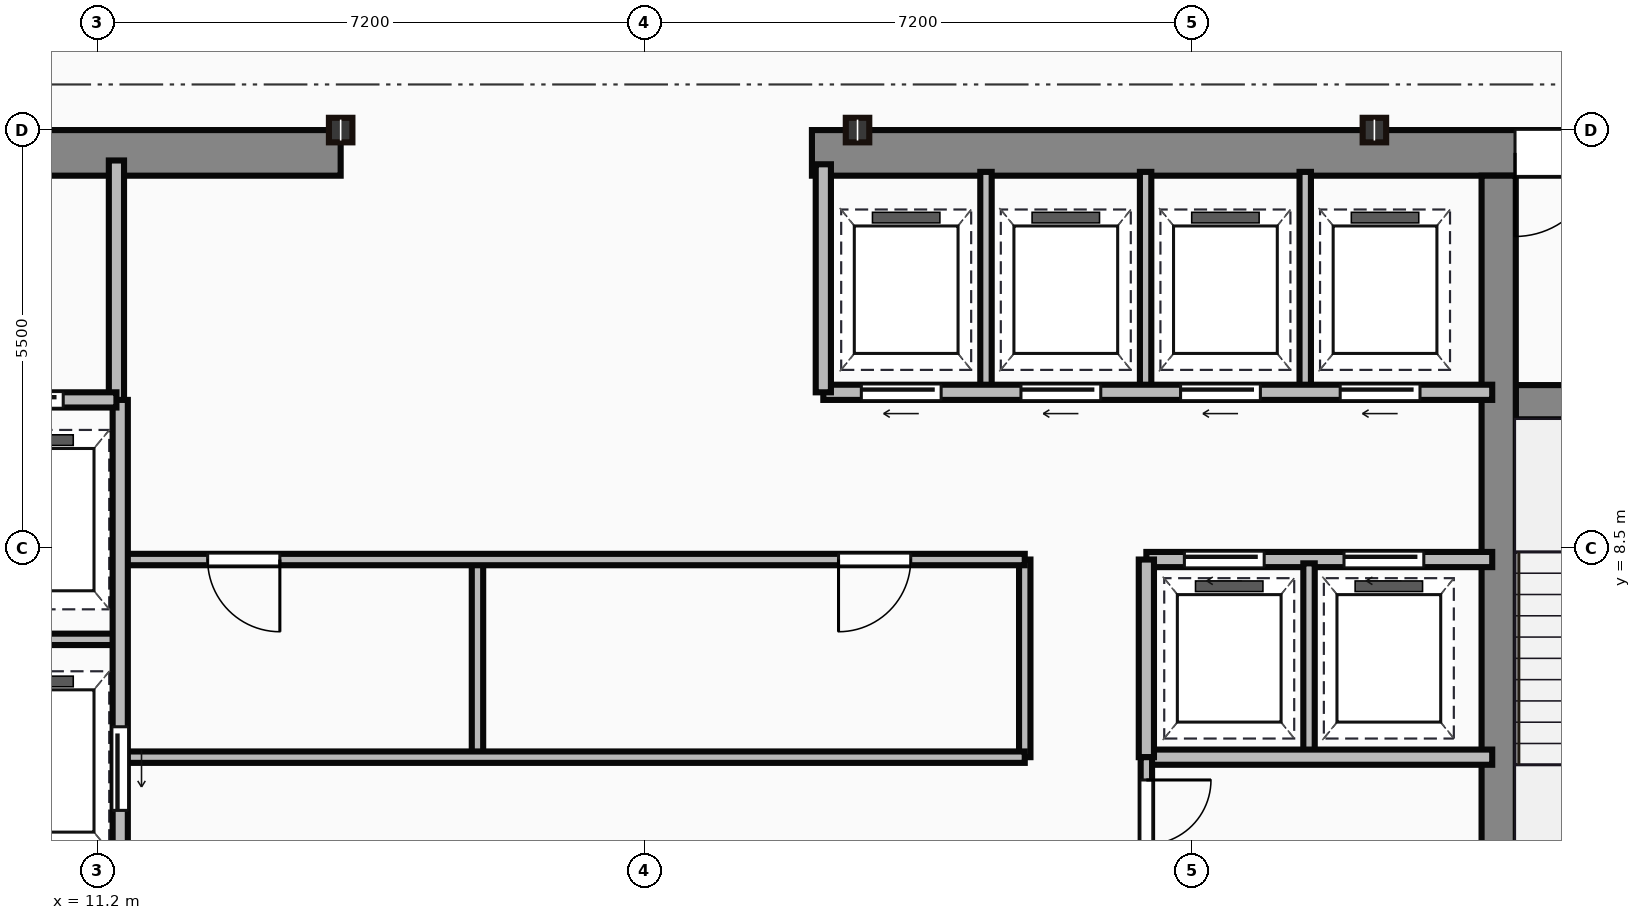
"""IFC4 building model, lengths in metres.
Left out: names, types, materials, properties, quantities, classifications, styles, units other than length and angle.
Written with IfcOpenShell. Run it as: python <this file> out.ifc"""

import sys

from ifc_helpers import new_model, si_unit, direction, frame, frame_2d, origin, origin_2d, place, context, subcontext, project, spatial, rectangle, i_section, extrude, source, transform, mapped, element, fill, save


model = new_model("IFC4")
c1 = context("Model", 3, precision=1e-05, world=origin(), true_north=direction((0.0, 1.0)))
c2 = subcontext(c1, "Body", "Model", "MODEL_VIEW")
j1 = project(units=[si_unit("LENGTHUNIT", "METRE"), si_unit("PLANEANGLEUNIT", "RADIAN")], contexts=[c1])
p1 = place(None, origin())
s1 = spatial("IfcSite", under=j1, at=p1, CompositionType="ELEMENT")
p2 = place(p1, origin())
s2 = spatial("IfcBuilding", under=s1, at=p2, CompositionType="ELEMENT")
p3 = place(p2, frame((0.0, 0.0, 228.75)))
s3 = spatial("IfcBuildingStorey", under=s2, at=p3, CompositionType="ELEMENT", Elevation=228.75)
m1 = source(origin(), c2, "Body", "SweptSolid", [
    extrude(rectangle(XDim=9.1, YDim=0.6, at=frame_2d((4.55, 0.0))), origin(), (0.0, 0.0, 1.0), 3.65),
])
p4 = place(p3, frame((5.3, 13.7, 0.0), z_axis=(0.0, 0.0, 1.0), x_axis=(1.0, 0.0, 0.0)))
e1 = element("IfcWall", 1, at=p4, inside=s3, PredefinedType="SHEAR", context=c2, shape_type="MappedRepresentation", body=[
    mapped(m1, transform((0.0, 0.0, 0.0))),
])
p5 = place(p4, frame((4.1, 0.0, 0.0)))
e2 = element("IfcOpeningElement", 2, at=p5, cuts=e1, PredefinedType="OPENING", context=c2, shape_type="SweptSolid", body=[
    extrude(rectangle(XDim=1.1, YDim=2.15, at=frame_2d((0.55, 1.075))), frame((0.0, 0.31, 0.0), z_axis=(0.0, -1.0, 0.0), x_axis=(1.0, 0.0, 0.0)), (0.0, 0.0, 1.0), 0.62),
])
m2 = source(origin(), c2, "Body", "SweptSolid", [
    extrude(rectangle(XDim=12.6, YDim=0.6, at=frame_2d((6.3, 0.0))), origin(), (0.0, 0.0, 1.0), 3.65),
])
p6 = place(p3, frame((20.6, 13.7, 0.0), z_axis=(0.0, 0.0, 1.0), x_axis=(1.0, 0.0, 0.0)))
e3 = element("IfcWall", 3, at=p6, inside=s3, PredefinedType="SHEAR", context=c2, shape_type="MappedRepresentation", body=[
    mapped(m2, transform((0.0, 0.0, 0.0))),
])
p7 = place(p6, frame((9.25, 0.0, 0.0)))
e4 = element("IfcOpeningElement", 4, at=p7, cuts=e3, PredefinedType="OPENING", context=c2, shape_type="SweptSolid", body=[
    extrude(rectangle(XDim=1.1, YDim=2.15, at=frame_2d((0.55, 1.075))), frame((0.0, 0.31, 0.0), z_axis=(0.0, -1.0, 0.0), x_axis=(1.0, 0.0, 0.0)), (0.0, 0.0, 1.0), 0.62),
])
m3 = source(origin(), c2, "Body", "SweptSolid", [
    extrude(rectangle(XDim=12.5, YDim=0.45, at=frame_2d((6.25, 0.0))), origin(), (0.0, 0.0, 1.0), 3.65),
])
p8 = place(p3, frame((29.635, 0.9, 0.0), z_axis=(0.0, 0.0, 1.0), x_axis=(0.0, 1.0, 0.0)))
e5 = element("IfcWall", 5, at=p8, inside=s3, PredefinedType="SHEAR", context=c2, shape_type="MappedRepresentation", body=[
    mapped(m3, transform((0.0, 0.0, 0.0))),
])
m4 = source(origin(), c2, "Body", "SweptSolid", [
    extrude(rectangle(XDim=3.39, YDim=0.45, at=frame_2d((1.695, 0.0))), origin(), (0.0, 0.0, 1.0), 3.65),
])
p9 = place(p3, frame((29.86, 10.42, 0.0), z_axis=(0.0, 0.0, 1.0), x_axis=(1.0, 0.0, 0.0)))
e6 = element("IfcWall", 6, at=p9, inside=s3, PredefinedType="SHEAR", context=c2, shape_type="MappedRepresentation", body=[
    mapped(m4, transform((0.0, 0.0, 0.0))),
])
p10 = place(p9, frame((1.1, 0.0, 0.0)))
e7 = element("IfcOpeningElement", 7, at=p10, cuts=e6, PredefinedType="OPENING", context=c2, shape_type="SweptSolid", body=[
    extrude(rectangle(XDim=1.1, YDim=2.15, at=frame_2d((0.55, 1.075))), frame((0.0, 0.235, 0.0), z_axis=(0.0, -1.0, 0.0), x_axis=(1.0, 0.0, 0.0)), (0.0, 0.0, 1.0), 0.47),
])
m5 = source(origin(), c2, "Body", "SweptSolid", [
    extrude(i_section(OverallWidth=0.309, OverallDepth=0.323, WebThickness=0.014, FlangeThickness=0.023, at=origin_2d()), origin(), (0.0, 0.0, 1.0), 3.65),
])
for number, where, z_axis, x_axis in (
    (8, (14.4, 14.0, 0.0), (0.0, 0.0, 1.0), (1.0, 0.0, 0.0)),
    (9, (21.2, 14.0, 0.0), (0.0, 0.0, 1.0), (1.0, 0.0, 0.0)),
    (10, (28.0, 14.0, 0.0), (0.0, 0.0, 1.0), (1.0, 0.0, 0.0)),
):
    element("IfcColumn", number, at=place(p3, frame(where, z_axis=z_axis, x_axis=x_axis)), inside=s3, PredefinedType="COLUMN", context=c2, shape_type="MappedRepresentation", body=[
        mapped(m5, transform((0.0, 0.0, 0.0))),
    ])
m6 = source(origin(), c2, "Body", "SweptSolid", [
    extrude(rectangle(XDim=3.18, YDim=0.2, at=frame_2d((1.59, 0.0))), origin(), (0.0, 0.0, 1.0), 3.4),
])
p11 = place(p3, frame((11.45, 10.42, 0.0), z_axis=(0.0, 0.0, 1.0), x_axis=(0.0, 1.0, 0.0)))
e11 = element("IfcWall", 11, at=p11, inside=s3, PredefinedType="PARTITIONING", context=c2, shape_type="MappedRepresentation", body=[
    mapped(m6, transform((0.0, 0.0, 0.0))),
])
m7 = source(origin(), c2, "Body", "SweptSolid", [
    extrude(rectangle(XDim=2.35, YDim=0.2, at=frame_2d((1.175, 0.0))), origin(), (0.0, 0.0, 1.0), 3.4),
])
p12 = place(p3, frame((9.1, 10.45, 0.0), z_axis=(0.0, 0.0, 1.0), x_axis=(1.0, 0.0, 0.0)))
e12 = element("IfcWall", 12, at=p12, inside=s3, PredefinedType="PARTITIONING", context=c2, shape_type="MappedRepresentation", body=[
    mapped(m7, transform((0.0, 0.0, 0.0))),
])
p13 = place(p12, frame((0.55, 0.0, 0.0)))
e13 = element("IfcOpeningElement", 13, at=p13, cuts=e12, PredefinedType="OPENING", context=c2, shape_type="SweptSolid", body=[
    extrude(rectangle(XDim=1.1, YDim=2.15, at=frame_2d((0.55, 1.075))), frame((0.0, 0.11, 0.0), z_axis=(0.0, -1.0, 0.0), x_axis=(1.0, 0.0, 0.0)), (0.0, 0.0, 1.0), 0.22),
])
m8 = source(origin(), c2, "Body", "SweptSolid", [
    extrude(rectangle(XDim=9.6, YDim=0.2, at=frame_2d((4.8, 0.0))), origin(), (0.0, 0.0, 1.0), 3.4),
])
p14 = place(p3, frame((11.5, 0.85, 0.0), z_axis=(0.0, 0.0, 1.0), x_axis=(0.0, 1.0, 0.0)))
e14 = element("IfcWall", 14, at=p14, inside=s3, PredefinedType="PARTITIONING", context=c2, shape_type="MappedRepresentation", body=[
    mapped(m8, transform((0.0, 0.0, 0.0))),
])
p15 = place(p14, frame((4.2, 0.0, 0.0)))
e15 = element("IfcOpeningElement", 15, at=p15, cuts=e14, PredefinedType="OPENING", context=c2, shape_type="SweptSolid", body=[
    extrude(rectangle(XDim=1.1, YDim=2.15, at=frame_2d((0.55, 1.075))), frame((0.0, 0.11, 0.0), z_axis=(0.0, -1.0, 0.0), x_axis=(1.0, 0.0, 0.0)), (0.0, 0.0, 1.0), 0.22),
])
p16 = place(p14, frame((0.9, 0.0, 0.0)))
e16 = element("IfcOpeningElement", 16, at=p16, cuts=e14, PredefinedType="OPENING", context=c2, shape_type="SweptSolid", body=[
    extrude(rectangle(XDim=1.2, YDim=2.15, at=frame_2d((0.6, 1.075))), frame((0.0, 0.11, 0.0), z_axis=(0.0, -1.0, 0.0), x_axis=(1.0, 0.0, 0.0)), (0.0, 0.0, 1.0), 0.22),
])
m9 = source(origin(), c2, "Body", "SweptSolid", [
    extrude(rectangle(XDim=2.4, YDim=0.15, at=frame_2d((1.2, 0.0))), origin(), (0.0, 0.0, 1.0), 3.4),
])
p17 = place(p3, frame((9.1, 7.3, 0.0), z_axis=(0.0, 0.0, 1.0), x_axis=(1.0, 0.0, 0.0)))
e17 = element("IfcWall", 17, at=p17, inside=s3, PredefinedType="PARTITIONING", context=c2, shape_type="MappedRepresentation", body=[
    mapped(m9, transform((0.0, 0.0, 0.0))),
])
m10 = source(origin(), c2, "Body", "SweptSolid", [
    extrude(rectangle(XDim=11.85, YDim=0.15, at=frame_2d((5.925, 0.0))), origin(), (0.0, 0.0, 1.0), 3.4),
])
p18 = place(p3, frame((11.55, 5.75, 0.0), z_axis=(0.0, 0.0, 1.0), x_axis=(1.0, 0.0, 0.0)))
e18 = element("IfcWall", 18, at=p18, inside=s3, PredefinedType="PARTITIONING", context=c2, shape_type="MappedRepresentation", body=[
    mapped(m10, transform((0.0, 0.0, 0.0))),
])
p19 = place(p3, frame((11.55, 8.35, 0.0), z_axis=(0.0, 0.0, 1.0), x_axis=(1.0, 0.0, 0.0)))
e19 = element("IfcWall", 19, at=p19, inside=s3, PredefinedType="PARTITIONING", context=c2, shape_type="MappedRepresentation", body=[
    mapped(m10, transform((0.0, 0.0, 0.0))),
])
p20 = place(p19, frame((1.1, 0.0, 0.0)))
e20 = element("IfcOpeningElement", 20, at=p20, cuts=e19, PredefinedType="OPENING", context=c2, shape_type="SweptSolid", body=[
    extrude(rectangle(XDim=0.95, YDim=2.15, at=frame_2d((0.475, 1.075))), frame((0.0, 0.085, 0.0), z_axis=(0.0, -1.0, 0.0), x_axis=(1.0, 0.0, 0.0)), (0.0, 0.0, 1.0), 0.17),
])
p21 = place(p19, frame((9.4, 0.0, 0.0)))
e21 = element("IfcOpeningElement", 21, at=p21, cuts=e19, PredefinedType="OPENING", context=c2, shape_type="SweptSolid", body=[
    extrude(rectangle(XDim=0.95, YDim=2.15, at=frame_2d((0.475, 1.075))), frame((0.0, 0.085, 0.0), z_axis=(0.0, -1.0, 0.0), x_axis=(1.0, 0.0, 0.0)), (0.0, 0.0, 1.0), 0.17),
])
m11 = source(origin(), c2, "Body", "SweptSolid", [
    extrude(rectangle(XDim=2.6, YDim=0.15, at=frame_2d((1.3, 0.0))), origin(), (0.0, 0.0, 1.0), 3.4),
])
p22 = place(p3, frame((23.4, 5.75, 0.0), z_axis=(0.0, 0.0, 1.0), x_axis=(0.0, 1.0, 0.0)))
e22 = element("IfcWall", 22, at=p22, inside=s3, PredefinedType="PARTITIONING", context=c2, shape_type="MappedRepresentation", body=[
    mapped(m11, transform((0.0, 0.0, 0.0))),
])
m12 = source(origin(), c2, "Body", "SweptSolid", [
    extrude(rectangle(XDim=2.5, YDim=0.15, at=frame_2d((1.25, 0.0))), origin(), (0.0, 0.0, 1.0), 3.4),
])
p23 = place(p3, frame((16.2, 5.8, 0.0), z_axis=(0.0, 0.0, 1.0), x_axis=(0.0, 1.0, 0.0)))
e23 = element("IfcWall", 23, at=p23, inside=s3, PredefinedType="PARTITIONING", context=c2, shape_type="MappedRepresentation", body=[
    mapped(m12, transform((0.0, 0.0, 0.0))),
])
m13 = source(origin(), c2, "Body", "SweptSolid", [
    extrude(rectangle(XDim=8.8, YDim=0.2, at=frame_2d((4.4, 0.0))), origin(), (0.0, 0.0, 1.0), 3.4),
])
p24 = place(p3, frame((20.75, 10.55, 0.0), z_axis=(0.0, 0.0, 1.0), x_axis=(1.0, 0.0, 0.0)))
e24 = element("IfcWall", 24, at=p24, inside=s3, PredefinedType="PARTITIONING", context=c2, shape_type="MappedRepresentation", body=[
    mapped(m13, transform((0.0, 0.0, 0.0))),
])
p25 = place(p24, frame((0.5, 0.0, 0.0)))
e25 = element("IfcOpeningElement", 25, at=p25, cuts=e24, PredefinedType="OPENING", context=c2, shape_type="SweptSolid", body=[
    extrude(rectangle(XDim=1.05, YDim=2.15, at=frame_2d((0.525, 1.075))), frame((0.0, 0.11, 0.0), z_axis=(0.0, -1.0, 0.0), x_axis=(1.0, 0.0, 0.0)), (0.0, 0.0, 1.0), 0.22),
])
p26 = place(p24, frame((2.6, 0.0, 0.0)))
e26 = element("IfcOpeningElement", 26, at=p26, cuts=e24, PredefinedType="OPENING", context=c2, shape_type="SweptSolid", body=[
    extrude(rectangle(XDim=1.05, YDim=2.15, at=frame_2d((0.525, 1.075))), frame((0.0, 0.11, 0.0), z_axis=(0.0, -1.0, 0.0), x_axis=(1.0, 0.0, 0.0)), (0.0, 0.0, 1.0), 0.22),
])
p27 = place(p24, frame((4.7, 0.0, 0.0)))
e27 = element("IfcOpeningElement", 27, at=p27, cuts=e24, PredefinedType="OPENING", context=c2, shape_type="SweptSolid", body=[
    extrude(rectangle(XDim=1.05, YDim=2.15, at=frame_2d((0.525, 1.075))), frame((0.0, 0.11, 0.0), z_axis=(0.0, -1.0, 0.0), x_axis=(1.0, 0.0, 0.0)), (0.0, 0.0, 1.0), 0.22),
])
p28 = place(p24, frame((6.8, 0.0, 0.0)))
e28 = element("IfcOpeningElement", 28, at=p28, cuts=e24, PredefinedType="OPENING", context=c2, shape_type="SweptSolid", body=[
    extrude(rectangle(XDim=1.05, YDim=2.15, at=frame_2d((0.525, 1.075))), frame((0.0, 0.11, 0.0), z_axis=(0.0, -1.0, 0.0), x_axis=(1.0, 0.0, 0.0)), (0.0, 0.0, 1.0), 0.22),
])
m14 = source(origin(), c2, "Body", "SweptSolid", [
    extrude(rectangle(XDim=3.0, YDim=0.2, at=frame_2d((1.5, 0.0))), origin(), (0.0, 0.0, 1.0), 3.4),
])
p29 = place(p3, frame((20.75, 10.55, 0.0), z_axis=(0.0, 0.0, 1.0), x_axis=(0.0, 1.0, 0.0)))
e29 = element("IfcWall", 29, at=p29, inside=s3, PredefinedType="PARTITIONING", context=c2, shape_type="MappedRepresentation", body=[
    mapped(m14, transform((0.0, 0.0, 0.0))),
])
m15 = source(origin(), c2, "Body", "SweptSolid", [
    extrude(rectangle(XDim=2.85, YDim=0.15, at=frame_2d((1.425, 0.0))), origin(), (0.0, 0.0, 1.0), 3.4),
])
for number, where, z_axis, x_axis in (
    (30, (22.89, 10.6, 0.0), (0.0, 0.0, 1.0), (0.0, 1.0, 0.0)),
    (31, (24.99, 10.6, 0.0), (0.0, 0.0, 1.0), (0.0, 1.0, 0.0)),
    (32, (27.09, 10.6, 0.0), (0.0, 0.0, 1.0), (0.0, 1.0, 0.0)),
):
    element("IfcWall", number, at=place(p3, frame(where, z_axis=z_axis, x_axis=x_axis)), inside=s3, PredefinedType="PARTITIONING", context=c2, shape_type="MappedRepresentation", body=[
        mapped(m15, transform((0.0, 0.0, 0.0))),
    ])
m16 = source(origin(), c2, "Body", "SweptSolid", [
    extrude(rectangle(XDim=4.55, YDim=0.2, at=frame_2d((2.275, 0.0))), origin(), (0.0, 0.0, 1.0), 3.4),
])
p30 = place(p3, frame((25.0, 8.35, 0.0), z_axis=(0.0, 0.0, 1.0), x_axis=(1.0, 0.0, 0.0)))
e33 = element("IfcWall", 33, at=p30, inside=s3, PredefinedType="PARTITIONING", context=c2, shape_type="MappedRepresentation", body=[
    mapped(m16, transform((0.0, 0.0, 0.0))),
])
p31 = place(p30, frame((0.5, 0.0, 0.0)))
e34 = element("IfcOpeningElement", 34, at=p31, cuts=e33, PredefinedType="OPENING", context=c2, shape_type="SweptSolid", body=[
    extrude(rectangle(XDim=1.05, YDim=2.15, at=frame_2d((0.525, 1.075))), frame((0.0, 0.11, 0.0), z_axis=(0.0, -1.0, 0.0), x_axis=(1.0, 0.0, 0.0)), (0.0, 0.0, 1.0), 0.22),
])
p32 = place(p30, frame((2.6, 0.0, 0.0)))
e35 = element("IfcOpeningElement", 35, at=p32, cuts=e33, PredefinedType="OPENING", context=c2, shape_type="SweptSolid", body=[
    extrude(rectangle(XDim=1.05, YDim=2.15, at=frame_2d((0.525, 1.075))), frame((0.0, 0.11, 0.0), z_axis=(0.0, -1.0, 0.0), x_axis=(1.0, 0.0, 0.0)), (0.0, 0.0, 1.0), 0.22),
])
p33 = place(p3, frame((25.0, 5.75, 0.0), z_axis=(0.0, 0.0, 1.0), x_axis=(1.0, 0.0, 0.0)))
e36 = element("IfcWall", 36, at=p33, inside=s3, PredefinedType="PARTITIONING", context=c2, shape_type="MappedRepresentation", body=[
    mapped(m16, transform((0.0, 0.0, 0.0))),
])
m17 = source(origin(), c2, "Body", "SweptSolid", [
    extrude(rectangle(XDim=2.6, YDim=0.2, at=frame_2d((1.3, 0.0))), origin(), (0.0, 0.0, 1.0), 3.4),
])
p34 = place(p3, frame((25.0, 5.75, 0.0), z_axis=(0.0, 0.0, 1.0), x_axis=(0.0, 1.0, 0.0)))
e37 = element("IfcWall", 37, at=p34, inside=s3, PredefinedType="PARTITIONING", context=c2, shape_type="MappedRepresentation", body=[
    mapped(m17, transform((0.0, 0.0, 0.0))),
])
p35 = place(p3, frame((27.14, 5.8, 0.0), z_axis=(0.0, 0.0, 1.0), x_axis=(0.0, 1.0, 0.0)))
e38 = element("IfcWall", 38, at=p35, inside=s3, PredefinedType="PARTITIONING", context=c2, shape_type="MappedRepresentation", body=[
    mapped(m12, transform((0.0, 0.0, 0.0))),
])
m18 = source(origin(), c2, "Body", "SweptSolid", [
    extrude(rectangle(XDim=4.9, YDim=0.15, at=frame_2d((2.45, 0.0))), origin(), (0.0, 0.0, 1.0), 3.4),
])
p36 = place(p3, frame((25.0, 0.85, 0.0), z_axis=(0.0, 0.0, 1.0), x_axis=(0.0, 1.0, 0.0)))
e39 = element("IfcWall", 39, at=p36, inside=s3, PredefinedType="PARTITIONING", context=c2, shape_type="MappedRepresentation", body=[
    mapped(m18, transform((0.0, 0.0, 0.0))),
])
p37 = place(p36, frame((2.0, 0.0, 0.0)))
e40 = element("IfcOpeningElement", 40, at=p37, cuts=e39, PredefinedType="OPENING", context=c2, shape_type="SweptSolid", body=[
    extrude(rectangle(XDim=0.95, YDim=2.15, at=frame_2d((0.475, 1.075))), frame((0.0, 0.085, 0.0), z_axis=(0.0, -1.0, 0.0), x_axis=(1.0, 0.0, 0.0)), (0.0, 0.0, 1.0), 0.17),
])
p38 = place(p36, frame((3.75, 0.0, 0.0)))
e41 = element("IfcOpeningElement", 41, at=p38, cuts=e39, PredefinedType="OPENING", context=c2, shape_type="SweptSolid", body=[
    extrude(rectangle(XDim=0.85, YDim=2.15, at=frame_2d((0.425, 1.075))), frame((0.0, 0.085, 0.0), z_axis=(0.0, -1.0, 0.0), x_axis=(1.0, 0.0, 0.0)), (0.0, 0.0, 1.0), 0.17),
])
m19 = source(origin(), c2, "Body", "SweptSolid", [
    extrude(rectangle(XDim=1.1, YDim=2.15, at=frame_2d((0.55, 1.075))), frame((0.0, 0.025, 0.0), z_axis=(0.0, -1.0, 0.0), x_axis=(1.0, 0.0, 0.0)), (0.0, 0.0, 1.0), 0.05),
])
p39 = place(p7, origin())
e42 = element("IfcDoor", 42, at=p39, inside=s3, OperationType="SINGLE_SWING_LEFT", PredefinedType="DOOR", context=c2, shape_type="MappedRepresentation", body=[
    mapped(m19, transform((0.0, 0.0, 0.0))),
])
fill(e4, e42)
p40 = place(p13, origin())
e43 = element("IfcDoor", 43, at=p40, inside=s3, OperationType="SLIDING_TO_LEFT", PredefinedType="DOOR", context=c2, shape_type="MappedRepresentation", body=[
    mapped(m19, transform((0.0, 0.0, 0.0))),
])
fill(e13, e43)
p41 = place(p15, frame((1.1, 0.0, 0.0), z_axis=(0.0, 0.0, 1.0), x_axis=(-1.0, 0.0, 0.0)))
e44 = element("IfcDoor", 44, at=p41, inside=s3, OperationType="SLIDING_TO_LEFT", PredefinedType="DOOR", context=c2, shape_type="MappedRepresentation", body=[
    mapped(m19, transform((0.0, 0.0, 0.0))),
])
fill(e15, e44)
m20 = source(origin(), c2, "Body", "SweptSolid", [
    extrude(rectangle(XDim=0.95, YDim=2.15, at=frame_2d((0.475, 1.075))), frame((0.0, 0.025, 0.0), z_axis=(0.0, -1.0, 0.0), x_axis=(1.0, 0.0, 0.0)), (0.0, 0.0, 1.0), 0.05),
])
p42 = place(p20, origin())
e45 = element("IfcDoor", 45, at=p42, inside=s3, OperationType="SINGLE_SWING_RIGHT", PredefinedType="DOOR", context=c2, shape_type="MappedRepresentation", body=[
    mapped(m20, transform((0.0, 0.0, 0.0))),
])
fill(e20, e45)
p43 = place(p21, origin())
e46 = element("IfcDoor", 46, at=p43, inside=s3, OperationType="SINGLE_SWING_LEFT", PredefinedType="DOOR", context=c2, shape_type="MappedRepresentation", body=[
    mapped(m20, transform((0.0, 0.0, 0.0))),
])
fill(e21, e46)
m21 = source(origin(), c2, "Body", "SweptSolid", [
    extrude(rectangle(XDim=1.05, YDim=2.15, at=frame_2d((0.525, 1.075))), frame((0.0, 0.025, 0.0), z_axis=(0.0, -1.0, 0.0), x_axis=(1.0, 0.0, 0.0)), (0.0, 0.0, 1.0), 0.05),
])
p44 = place(p25, frame((1.05, 0.0, 0.0), z_axis=(0.0, 0.0, 1.0), x_axis=(-1.0, 0.0, 0.0)))
e47 = element("IfcDoor", 47, at=p44, inside=s3, OperationType="SLIDING_TO_LEFT", PredefinedType="DOOR", context=c2, shape_type="MappedRepresentation", body=[
    mapped(m21, transform((0.0, 0.0, 0.0))),
])
fill(e25, e47)
p45 = place(p26, frame((1.05, 0.0, 0.0), z_axis=(0.0, 0.0, 1.0), x_axis=(-1.0, 0.0, 0.0)))
e48 = element("IfcDoor", 48, at=p45, inside=s3, OperationType="SLIDING_TO_LEFT", PredefinedType="DOOR", context=c2, shape_type="MappedRepresentation", body=[
    mapped(m21, transform((0.0, 0.0, 0.0))),
])
fill(e26, e48)
p46 = place(p27, frame((1.05, 0.0, 0.0), z_axis=(0.0, 0.0, 1.0), x_axis=(-1.0, 0.0, 0.0)))
e49 = element("IfcDoor", 49, at=p46, inside=s3, OperationType="SLIDING_TO_LEFT", PredefinedType="DOOR", context=c2, shape_type="MappedRepresentation", body=[
    mapped(m21, transform((0.0, 0.0, 0.0))),
])
fill(e27, e49)
p47 = place(p28, frame((1.05, 0.0, 0.0), z_axis=(0.0, 0.0, 1.0), x_axis=(-1.0, 0.0, 0.0)))
e50 = element("IfcDoor", 50, at=p47, inside=s3, OperationType="SLIDING_TO_LEFT", PredefinedType="DOOR", context=c2, shape_type="MappedRepresentation", body=[
    mapped(m21, transform((0.0, 0.0, 0.0))),
])
fill(e28, e50)
p48 = place(p31, origin())
e51 = element("IfcDoor", 51, at=p48, inside=s3, OperationType="SLIDING_TO_LEFT", PredefinedType="DOOR", context=c2, shape_type="MappedRepresentation", body=[
    mapped(m21, transform((0.0, 0.0, 0.0))),
])
fill(e34, e51)
p49 = place(p32, origin())
e52 = element("IfcDoor", 52, at=p49, inside=s3, OperationType="SLIDING_TO_LEFT", PredefinedType="DOOR", context=c2, shape_type="MappedRepresentation", body=[
    mapped(m21, transform((0.0, 0.0, 0.0))),
])
fill(e35, e52)
m22 = source(origin(), c2, "Body", "SweptSolid", [
    extrude(rectangle(XDim=0.85, YDim=2.15, at=frame_2d((0.425, 1.075))), frame((0.0, 0.025, 0.0), z_axis=(0.0, -1.0, 0.0), x_axis=(1.0, 0.0, 0.0)), (0.0, 0.0, 1.0), 0.05),
])
p50 = place(p38, origin())
e53 = element("IfcDoor", 53, at=p50, inside=s3, OperationType="SINGLE_SWING_RIGHT", PredefinedType="DOOR", context=c2, shape_type="MappedRepresentation", body=[
    mapped(m22, transform((0.0, 0.0, 0.0))),
])
fill(e41, e53)
save(model, sys.argv[1])
